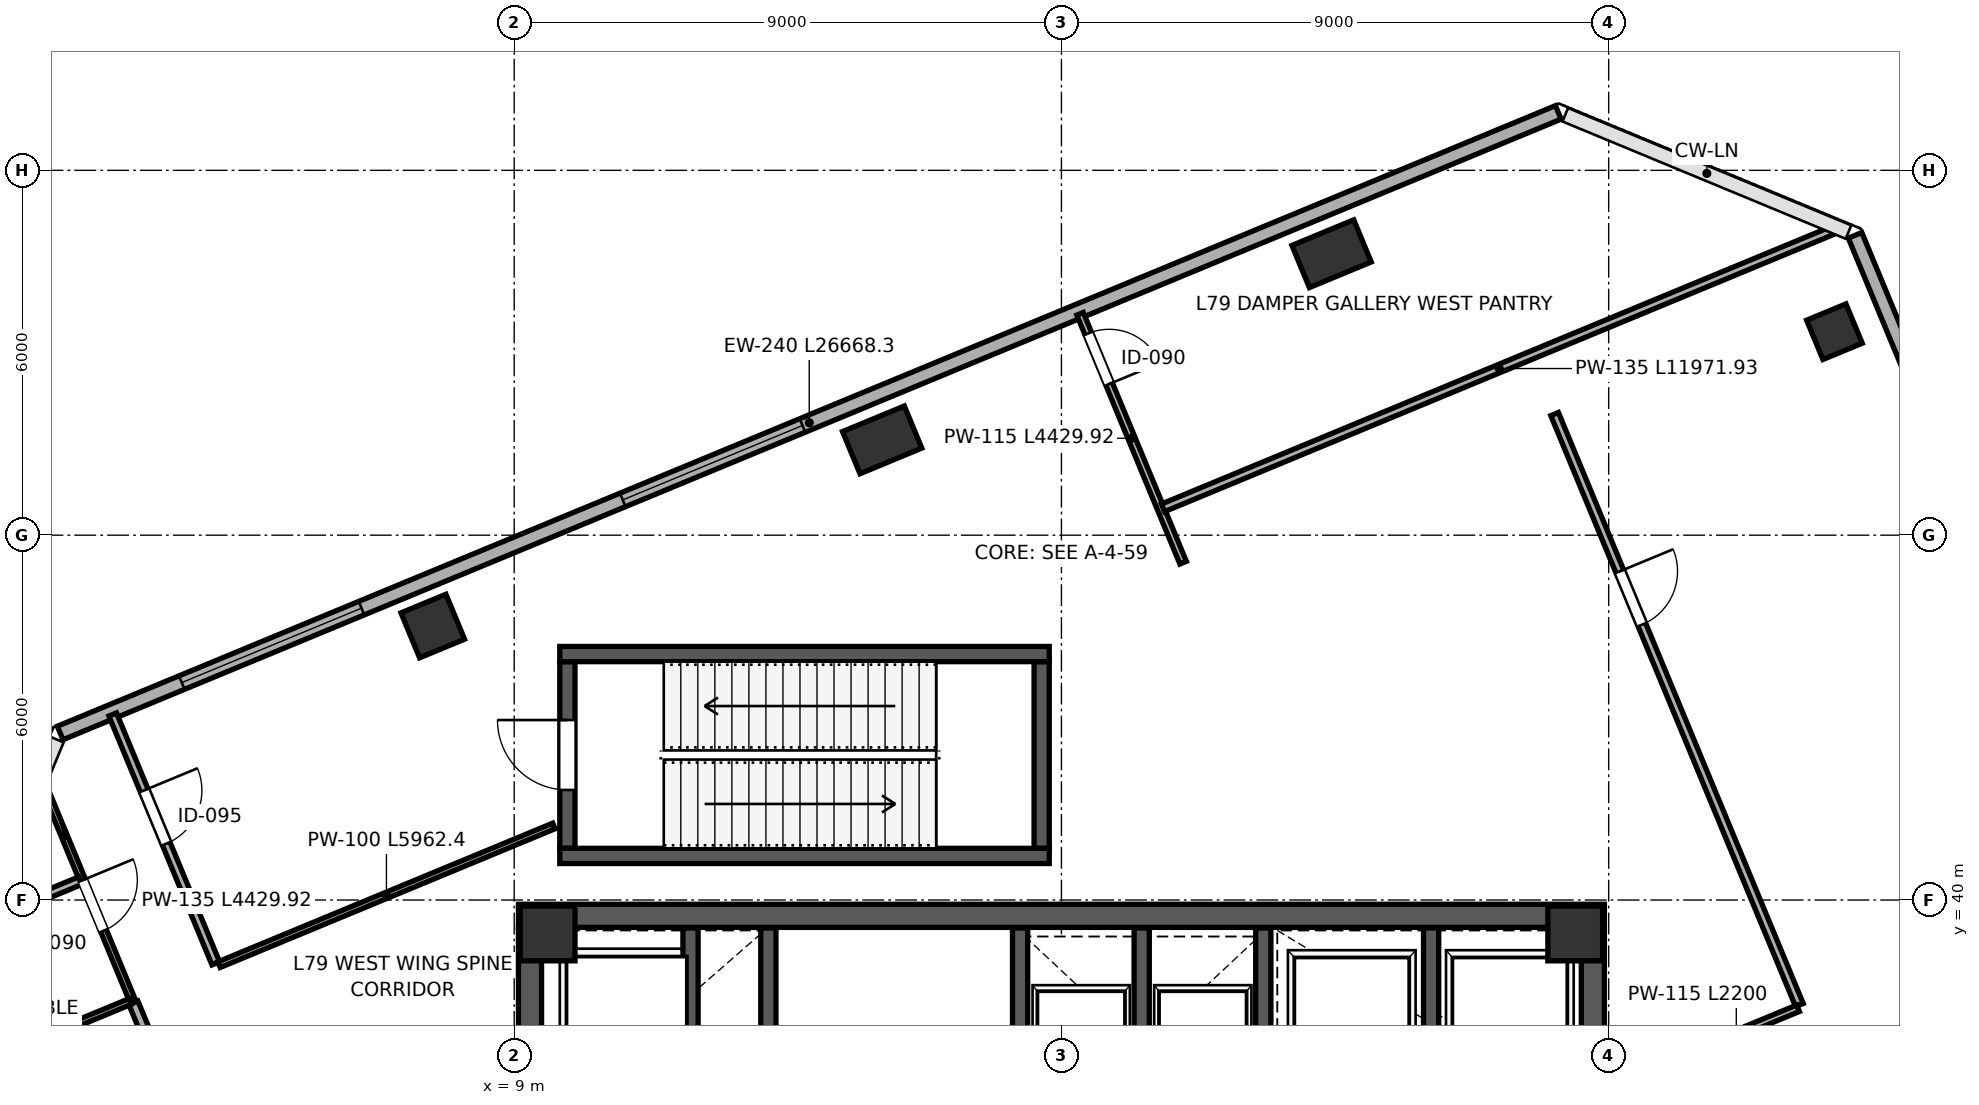
"""IFC4 building model, lengths in metres.
Left out: names, types, materials, properties, quantities, classifications, styles, units other than length and angle.
Written with IfcOpenShell. Run it as: python <this file> out.ifc"""

import sys

from ifc_helpers import new_model, si_unit, direction, frame, frame_2d, origin, origin_2d, place, context, subcontext, project, spatial, rectangle, extrude, source, transform, mapped, element, fill, save


model = new_model("IFC4")
c1 = context("Model", 3, precision=1e-05, world=origin(), true_north=direction((0.0, 1.0)))
c2 = subcontext(c1, "Body", "Model", "MODEL_VIEW")
j1 = project(units=[si_unit("LENGTHUNIT", "METRE"), si_unit("PLANEANGLEUNIT", "RADIAN")], contexts=[c1])
p1 = place(None, origin())
s1 = spatial("IfcSite", under=j1, at=p1, CompositionType="ELEMENT")
p2 = place(p1, origin())
s2 = spatial("IfcBuilding", under=s1, at=p2, CompositionType="ELEMENT")
p3 = place(p2, frame((0.0, 0.0, 349.2)))
s3 = spatial("IfcBuildingStorey", under=s2, at=p3, CompositionType="ELEMENT", Elevation=349.2)
m1 = source(origin(), c2, "Body", "SweptSolid", [
    extrude(rectangle(XDim=0.9, YDim=0.9, at=origin_2d()), origin(), (0.0, 0.0, 1.0), 5.999),
])
for number, where, z_axis, x_axis in (
    (1, (9.55, 39.45, 0.001), (0.0, 0.0, 1.0), (1.0, 0.0, 0.0)),
    (2, (26.45, 39.45, 0.001), (0.0, 0.0, 1.0), (1.0, 0.0, 0.0)),
):
    element("IfcColumn", number, at=place(p3, frame(where, z_axis=z_axis, x_axis=x_axis)), inside=s3, PredefinedType="COLUMN", context=c2, shape_type="MappedRepresentation", body=[
        mapped(m1, transform((0.0, 0.0, 0.0), scale=1.0)),
    ])
m2 = source(origin(), c2, "Body", "SweptSolid", [
    extrude(rectangle(XDim=0.7, YDim=0.7, at=origin_2d()), origin(), (0.0, 0.0, 1.0), 5.999),
])
p4 = place(p3, frame((30.713, 49.346, 0.001), z_axis=(0.0, 0.0, 1.0), x_axis=(-0.382683432365, 0.923879532511, 0.0)))
e3 = element("IfcColumn", 3, at=p4, inside=s3, PredefinedType="COLUMN", context=c2, shape_type="MappedRepresentation", body=[
    mapped(m2, transform((0.0, 0.0, 0.0), scale=1.0)),
])
m3 = source(origin(), c2, "Body", "SweptSolid", [
    extrude(rectangle(XDim=0.8, YDim=0.8, at=origin_2d()), origin(), (0.0, 0.0, 1.0), 5.999),
])
p5 = place(p3, frame((7.661, 44.506, 0.001), z_axis=(0.0, 0.0, 1.0), x_axis=(-0.382683432365, 0.923879532511, 0.0)))
e4 = element("IfcColumn", 4, at=p5, inside=s3, PredefinedType="COLUMN", context=c2, shape_type="MappedRepresentation", body=[
    mapped(m3, transform((0.0, 0.0, 0.0), scale=1.0)),
])
m4 = source(origin(), c2, "Body", "SweptSolid", [
    extrude(rectangle(XDim=0.75, YDim=1.1, at=origin_2d()), origin(), (0.0, 0.0, 1.0), 5.999),
])
for number, where, z_axis, x_axis in (
    (5, (15.052, 47.567, 0.001), (0.0, 0.0, 1.0), (-0.383, 0.924, 0.0)),
    (6, (22.443, 50.629, 0.001), (0.0, 0.0, 1.0), (-0.383, 0.924, 0.0)),
):
    element("IfcColumn", number, at=place(p3, frame(where, z_axis=z_axis, x_axis=x_axis)), inside=s3, PredefinedType="PILASTER", context=c2, shape_type="MappedRepresentation", body=[
        mapped(m4, transform((0.0, 0.0, 0.0), scale=1.0)),
    ])
p6 = place(p3, frame((40.761, 27.494, 0.0), z_axis=(0.0, 0.0, 1.0), x_axis=(-0.382690925775, 0.923876428604, 0.0)))
e7 = element("IfcWall", 7, at=p6, inside=s3, PredefinedType="SOLIDWALL", context=c2, shape_type="SweptSolid", body=[
    extrude(rectangle(XDim=25.368, YDim=0.24, at=frame_2d((12.684, 0.0))), origin(), (0.0, 0.0, 1.0), 5.76),
])
p7 = place(p6, frame((1.594, 0.0, 0.45)))
e8 = element("IfcOpeningElement", 8, at=p7, cuts=e7, PredefinedType="OPENING", context=c2, shape_type="SweptSolid", body=[
    extrude(rectangle(XDim=3.2, YDim=2.5, at=frame_2d((1.6, 1.25))), frame((0.0, 0.13, 0.0), z_axis=(0.0, -1.0, 0.0), x_axis=(1.0, 0.0, 0.0)), (0.0, 0.0, 1.0), 0.26),
])
p8 = place(p6, frame((5.144, 0.0, 0.45)))
e9 = element("IfcOpeningElement", 9, at=p8, cuts=e7, PredefinedType="OPENING", context=c2, shape_type="SweptSolid", body=[
    extrude(rectangle(XDim=3.2, YDim=2.5, at=frame_2d((1.6, 1.25))), frame((0.0, 0.13, 0.0), z_axis=(0.0, -1.0, 0.0), x_axis=(1.0, 0.0, 0.0)), (0.0, 0.0, 1.0), 0.26),
])
p9 = place(p6, frame((8.694, 0.0, 0.45)))
e10 = element("IfcOpeningElement", 10, at=p9, cuts=e7, PredefinedType="OPENING", context=c2, shape_type="SweptSolid", body=[
    extrude(rectangle(XDim=3.2, YDim=2.5, at=frame_2d((1.6, 1.25))), frame((0.0, 0.13, 0.0), z_axis=(0.0, -1.0, 0.0), x_axis=(1.0, 0.0, 0.0)), (0.0, 0.0, 1.0), 0.26),
])
p10 = place(p6, frame((12.244, 0.0, 0.45)))
e11 = element("IfcOpeningElement", 11, at=p10, cuts=e7, PredefinedType="OPENING", context=c2, shape_type="SweptSolid", body=[
    extrude(rectangle(XDim=3.2, YDim=2.5, at=frame_2d((1.6, 1.25))), frame((0.0, 0.13, 0.0), z_axis=(0.0, -1.0, 0.0), x_axis=(1.0, 0.0, 0.0)), (0.0, 0.0, 1.0), 0.26),
])
p11 = place(p6, frame((15.794, 0.0, 0.45)))
e12 = element("IfcOpeningElement", 12, at=p11, cuts=e7, PredefinedType="OPENING", context=c2, shape_type="SweptSolid", body=[
    extrude(rectangle(XDim=3.2, YDim=2.5, at=frame_2d((1.6, 1.25))), frame((0.0, 0.13, 0.0), z_axis=(0.0, -1.0, 0.0), x_axis=(1.0, 0.0, 0.0)), (0.0, 0.0, 1.0), 0.26),
])
p12 = place(p6, frame((19.344, 0.0, 0.45)))
e13 = element("IfcOpeningElement", 13, at=p12, cuts=e7, PredefinedType="OPENING", context=c2, shape_type="SweptSolid", body=[
    extrude(rectangle(XDim=3.2, YDim=2.5, at=frame_2d((1.6, 1.25))), frame((0.0, 0.13, 0.0), z_axis=(0.0, -1.0, 0.0), x_axis=(1.0, 0.0, 0.0)), (0.0, 0.0, 1.0), 0.26),
])
p13 = place(p3, frame((26.171, 52.953, 0.0), z_axis=(0.0, 0.0, 1.0), x_axis=(-0.923878251708, -0.382686524484, 0.0)))
e14 = element("IfcWall", 14, at=p13, inside=s3, PredefinedType="SOLIDWALL", context=c2, shape_type="SweptSolid", body=[
    extrude(rectangle(XDim=26.668, YDim=0.24, at=frame_2d((13.334, 0.0))), origin(), (0.0, 0.0, 1.0), 5.76),
])
p14 = place(p13, frame((13.454, 0.0, 0.45)))
e15 = element("IfcOpeningElement", 15, at=p14, cuts=e14, PredefinedType="OPENING", context=c2, shape_type="SweptSolid", body=[
    extrude(rectangle(XDim=3.2, YDim=2.5, at=frame_2d((1.6, 1.25))), frame((0.0, 0.13, 0.0), z_axis=(0.0, -1.0, 0.0), x_axis=(1.0, 0.0, 0.0)), (0.0, 0.0, 1.0), 0.26),
])
p15 = place(p13, frame((21.304, 0.0, 0.45)))
e16 = element("IfcOpeningElement", 16, at=p15, cuts=e14, PredefinedType="OPENING", context=c2, shape_type="SweptSolid", body=[
    extrude(rectangle(XDim=3.2, YDim=2.5, at=frame_2d((1.6, 1.25))), frame((0.0, 0.13, 0.0), z_axis=(0.0, -1.0, 0.0), x_axis=(1.0, 0.0, 0.0)), (0.0, 0.0, 1.0), 0.26),
])
p16 = place(p3, frame((9.26, 24.45, 0.0), z_axis=(0.0, 0.0, 1.0), x_axis=(0.0, 1.0, 0.0)))
e17 = element("IfcWall", 17, at=p16, inside=s3, PredefinedType="SHEAR", context=c2, shape_type="SweptSolid", body=[
    extrude(rectangle(XDim=15.1, YDim=0.38, at=frame_2d((7.55, 0.0))), origin(), (0.0, 0.0, 1.0), 5.76),
])
p17 = place(p16, frame((8.7, 0.0, 0.0)))
e18 = element("IfcOpeningElement", 18, at=p17, cuts=e17, PredefinedType="OPENING", context=c2, shape_type="SweptSolid", body=[
    extrude(rectangle(XDim=1.15, YDim=2.2, at=frame_2d((0.575, 1.1))), frame((0.0, 0.2, 0.0), z_axis=(0.0, -1.0, 0.0), x_axis=(1.0, 0.0, 0.0)), (0.0, 0.0, 1.0), 0.4),
])
p18 = place(p3, frame((26.74, 24.45, 0.0), z_axis=(0.0, 0.0, 1.0), x_axis=(0.0, 1.0, 0.0)))
e19 = element("IfcWall", 19, at=p18, inside=s3, PredefinedType="SHEAR", context=c2, shape_type="SweptSolid", body=[
    extrude(rectangle(XDim=15.1, YDim=0.38, at=frame_2d((7.55, 0.0))), origin(), (0.0, 0.0, 1.0), 5.76),
])
p19 = place(p18, frame((8.6, 0.0, 0.0)))
e20 = element("IfcOpeningElement", 20, at=p19, cuts=e19, PredefinedType="OPENING", context=c2, shape_type="SweptSolid", body=[
    extrude(rectangle(XDim=1.15, YDim=2.2, at=frame_2d((0.575, 1.1))), frame((0.0, 0.2, 0.0), z_axis=(0.0, -1.0, 0.0), x_axis=(1.0, 0.0, 0.0)), (0.0, 0.0, 1.0), 0.4),
])
p20 = place(p3, frame((9.07, 39.74, 0.0), z_axis=(0.0, 0.0, 1.0), x_axis=(1.0, 0.0, 0.0)))
e21 = element("IfcWall", 21, at=p20, inside=s3, PredefinedType="SHEAR", context=c2, shape_type="SweptSolid", body=[
    extrude(rectangle(XDim=17.86, YDim=0.38, at=frame_2d((8.93, 0.0))), origin(), (0.0, 0.0, 1.0), 5.76),
])
p21 = place(p3, frame((21.32, 32.12, 0.0), z_axis=(0.0, 0.0, 1.0), x_axis=(0.0, 1.0, 0.0)))
e22 = element("IfcWall", 22, at=p21, inside=s3, PredefinedType="SHEAR", context=c2, shape_type="SweptSolid", body=[
    extrude(rectangle(XDim=7.42, YDim=0.25, at=frame_2d((3.71, 0.0))), origin(), (0.0, 0.0, 1.0), 5.76),
])
p22 = place(p21, frame((1.4, 0.0, 0.0)))
e23 = element("IfcOpeningElement", 23, at=p22, cuts=e22, PredefinedType="OPENING", context=c2, shape_type="SweptSolid", body=[
    extrude(rectangle(XDim=1.15, YDim=2.2, at=frame_2d((0.575, 1.1))), frame((0.0, 0.135, 0.0), z_axis=(0.0, -1.0, 0.0), x_axis=(1.0, 0.0, 0.0)), (0.0, 0.0, 1.0), 0.27),
])
p23 = place(p3, frame((11.9, 36.31, 0.0), z_axis=(0.0, 0.0, 1.0), x_axis=(0.0, 1.0, 0.0)))
e24 = element("IfcWall", 24, at=p23, inside=s3, PredefinedType="SHEAR", context=c2, shape_type="SweptSolid", body=[
    extrude(rectangle(XDim=3.23, YDim=0.25, at=frame_2d((1.615, 0.0))), origin(), (0.0, 0.0, 1.0), 5.76),
])
p24 = place(p3, frame((24.08, 36.48, 0.0), z_axis=(0.0, 0.0, 1.0), x_axis=(0.0, 1.0, 0.0)))
e25 = element("IfcWall", 25, at=p24, inside=s3, PredefinedType="SHEAR", context=c2, shape_type="SweptSolid", body=[
    extrude(rectangle(XDim=3.06, YDim=0.25, at=frame_2d((1.53, 0.0))), origin(), (0.0, 0.0, 1.0), 5.76),
])
p25 = place(p3, frame((13.18, 36.2, 0.0), z_axis=(0.0, 0.0, 1.0), x_axis=(0.0, 1.0, 0.0)))
e26 = element("IfcWall", 26, at=p25, inside=s3, PredefinedType="SHEAR", context=c2, shape_type="SweptSolid", body=[
    extrude(rectangle(XDim=3.34, YDim=0.25, at=frame_2d((1.67, 0.0))), origin(), (0.0, 0.0, 1.0), 5.76),
])
for number, where, z_axis, x_axis in (
    (27, (17.32, 35.81, 0.0), (0.0, 0.0, 1.0), (0.0, 1.0, 0.0)),
    (28, (19.32, 35.81, 0.0), (0.0, 0.0, 1.0), (0.0, 1.0, 0.0)),
):
    element("IfcWall", number, at=place(p3, frame(where, z_axis=z_axis, x_axis=x_axis)), inside=s3, PredefinedType="SHEAR", context=c2, shape_type="SweptSolid", body=[
        extrude(rectangle(XDim=3.73, YDim=0.25, at=frame_2d((1.865, 0.0))), origin(), (0.0, 0.0, 1.0), 5.76),
    ])
p26 = place(p3, frame((9.875, 40.85, 0.0), z_axis=(0.0, 0.0, 1.0), x_axis=(0.0, 1.0, 0.0)))
e29 = element("IfcWall", 29, at=p26, inside=s3, PredefinedType="SHEAR", context=c2, shape_type="SweptSolid", body=[
    extrude(rectangle(XDim=3.07, YDim=0.25, at=frame_2d((1.535, 0.0))), origin(), (0.0, 0.0, 1.0), 5.76),
])
p27 = place(p26, frame((0.96, 0.0, 0.0)))
e30 = element("IfcOpeningElement", 30, at=p27, cuts=e29, PredefinedType="OPENING", context=c2, shape_type="SweptSolid", body=[
    extrude(rectangle(XDim=1.15, YDim=2.2, at=frame_2d((0.575, 1.1))), frame((0.0, 0.135, 0.0), z_axis=(0.0, -1.0, 0.0), x_axis=(1.0, 0.0, 0.0)), (0.0, 0.0, 1.0), 0.27),
])
p28 = place(p3, frame((17.675, 40.85, 0.0), z_axis=(0.0, 0.0, 1.0), x_axis=(0.0, 1.0, 0.0)))
e31 = element("IfcWall", 31, at=p28, inside=s3, PredefinedType="SHEAR", context=c2, shape_type="SweptSolid", body=[
    extrude(rectangle(XDim=3.07, YDim=0.25, at=frame_2d((1.535, 0.0))), origin(), (0.0, 0.0, 1.0), 5.76),
])
for number, where, z_axis, x_axis in (
    (32, (9.75, 40.725, 0.0), (0.0, 0.0, 1.0), (1.0, 0.0, 0.0)),
    (33, (9.75, 44.045, 0.0), (0.0, 0.0, 1.0), (1.0, 0.0, 0.0)),
):
    element("IfcWall", number, at=place(p3, frame(where, z_axis=z_axis, x_axis=x_axis)), inside=s3, PredefinedType="SHEAR", context=c2, shape_type="SweptSolid", body=[
        extrude(rectangle(XDim=8.05, YDim=0.25, at=frame_2d((4.025, 0.0))), origin(), (0.0, 0.0, 1.0), 5.76),
    ])
p29 = place(p3, frame((1.232, 41.943, 0.0), z_axis=(0.0, 0.0, 1.0), x_axis=(0.382652221475, -0.923892459868, 0.0)))
e34 = element("IfcWall", 34, at=p29, inside=s3, PredefinedType="PARTITIONING", context=c2, shape_type="SweptSolid", body=[
    extrude(rectangle(XDim=3.852, YDim=0.1, at=frame_2d((1.926, 0.0))), origin(), (0.0, 0.0, 1.0), 5.76),
])
p30 = place(p29, frame((1.75, 0.0, 0.0)))
e35 = element("IfcOpeningElement", 35, at=p30, cuts=e34, PredefinedType="OPENING", context=c2, shape_type="SweptSolid", body=[
    extrude(rectangle(XDim=0.9, YDim=2.15, at=frame_2d((0.45, 1.075))), frame((0.0, 0.06, 0.0), z_axis=(0.0, -1.0, 0.0), x_axis=(1.0, 0.0, 0.0)), (0.0, 0.0, 1.0), 0.12),
])
p31 = place(p3, frame((0.29, 39.667, 0.0), z_axis=(0.0, 0.0, 1.0), x_axis=(0.923855963606, 0.38274032778, 0.0)))
e36 = element("IfcWall", 36, at=p31, inside=s3, PredefinedType="PARTITIONING", context=c2, shape_type="SweptSolid", body=[
    extrude(rectangle(XDim=1.702, YDim=0.135, at=frame_2d((0.851, 0.0))), origin(), (0.0, 0.0, 1.0), 5.76),
])
p32 = place(p3, frame((2.737, 38.31, 0.0), z_axis=(0.0, 0.0, 1.0), x_axis=(0.382706260748, -0.923870076355, 0.0)))
e37 = element("IfcWall", 37, at=p32, inside=s3, PredefinedType="PARTITIONING", context=c2, shape_type="SweptSolid", body=[
    extrude(rectangle(XDim=3.67, YDim=0.16, at=frame_2d((1.835, 0.0))), origin(), (0.0, 0.0, 1.0), 5.76),
])
p33 = place(p32, frame((0.85, 0.0, 0.0)))
e38 = element("IfcOpeningElement", 38, at=p33, cuts=e37, PredefinedType="OPENING", context=c2, shape_type="SweptSolid", body=[
    extrude(rectangle(XDim=0.95, YDim=2.15, at=frame_2d((0.475, 1.075))), frame((0.0, 0.09, 0.0), z_axis=(0.0, -1.0, 0.0), x_axis=(1.0, 0.0, 0.0)), (0.0, 0.0, 1.0), 0.18),
])
p34 = place(p3, frame((-0.142, 37.161, 0.0), z_axis=(0.0, 0.0, 1.0), x_axis=(0.923868053335, 0.382711144374, 0.0)))
e39 = element("IfcWall", 39, at=p34, inside=s3, PredefinedType="PARTITIONING", context=c2, shape_type="SweptSolid", body=[
    extrude(rectangle(XDim=3.06, YDim=0.1, at=frame_2d((1.53, 0.0))), origin(), (0.0, 0.0, 1.0), 5.76),
])
p35 = place(p3, frame((26.111, 47.992, 0.0), z_axis=(0.0, 0.0, 1.0), x_axis=(0.382686563741, -0.923878235447, 0.0)))
e40 = element("IfcWall", 40, at=p35, inside=s3, PredefinedType="PARTITIONING", context=c2, shape_type="SweptSolid", body=[
    extrude(rectangle(XDim=10.52, YDim=0.135, at=frame_2d((5.26, 0.0))), origin(), (0.0, 0.0, 1.0), 5.76),
])
p36 = place(p35, frame((2.8, 0.0, 0.0)))
e41 = element("IfcOpeningElement", 41, at=p36, cuts=e40, PredefinedType="OPENING", context=c2, shape_type="SweptSolid", body=[
    extrude(rectangle(XDim=0.95, YDim=2.15, at=frame_2d((0.475, 1.075))), frame((0.0, 0.078, 0.0), z_axis=(0.0, -1.0, 0.0), x_axis=(1.0, 0.0, 0.0)), (0.0, 0.0, 1.0), 0.155),
])
p37 = place(p3, frame((28.083, 37.378, 0.0), z_axis=(0.0, 0.0, 1.0), x_axis=(0.923853160736, 0.382747093259, 0.0)))
e42 = element("IfcWall", 42, at=p37, inside=s3, PredefinedType="PARTITIONING", context=c2, shape_type="SweptSolid", body=[
    extrude(rectangle(XDim=2.2, YDim=0.115, at=frame_2d((1.1, 0.0))), origin(), (0.0, 0.0, 1.0), 5.76),
])
p38 = place(p3, frame((2.397, 43.051, 0.0), z_axis=(0.0, 0.0, 1.0), x_axis=(0.382689257808, -0.923877119512, 0.0)))
e43 = element("IfcWall", 43, at=p38, inside=s3, PredefinedType="PARTITIONING", context=c2, shape_type="SweptSolid", body=[
    extrude(rectangle(XDim=4.43, YDim=0.135, at=frame_2d((2.215, 0.0))), origin(), (0.0, 0.0, 1.0), 5.76),
])
p39 = place(p38, frame((1.35, 0.0, 0.0)))
e44 = element("IfcOpeningElement", 44, at=p39, cuts=e43, PredefinedType="OPENING", context=c2, shape_type="SweptSolid", body=[
    extrude(rectangle(XDim=0.95, YDim=2.15, at=frame_2d((0.475, 1.075))), frame((0.0, 0.078, 0.0), z_axis=(0.0, -1.0, 0.0), x_axis=(1.0, 0.0, 0.0)), (0.0, 0.0, 1.0), 0.155),
])
p40 = place(p3, frame((18.306, 49.64, 0.0), z_axis=(0.0, 0.0, 1.0), x_axis=(0.382708743564, -0.923869047863, 0.0)))
e45 = element("IfcWall", 45, at=p40, inside=s3, PredefinedType="PARTITIONING", context=c2, shape_type="SweptSolid", body=[
    extrude(rectangle(XDim=4.43, YDim=0.115, at=frame_2d((2.215, 0.0))), origin(), (0.0, 0.0, 1.0), 5.095),
])
p41 = place(p40, frame((0.35, 0.0, 0.0)))
e46 = element("IfcOpeningElement", 46, at=p41, cuts=e45, PredefinedType="OPENING", context=c2, shape_type="SweptSolid", body=[
    extrude(rectangle(XDim=0.9, YDim=2.15, at=frame_2d((0.45, 1.075))), frame((0.0, 0.067, 0.0), z_axis=(0.0, -1.0, 0.0), x_axis=(1.0, 0.0, 0.0)), (0.0, 0.0, 1.0), 0.135),
])
p42 = place(p3, frame((4.145, 38.936, 0.0), z_axis=(0.0, 0.0, 1.0), x_axis=(0.923878093623, 0.38268690613, 0.0)))
e47 = element("IfcWall", 47, at=p42, inside=s3, PredefinedType="PARTITIONING", context=c2, shape_type="SweptSolid", body=[
    extrude(rectangle(XDim=5.962, YDim=0.1, at=frame_2d((2.981, 0.0))), origin(), (0.0, 0.0, 1.0), 5.76),
])
p43 = place(p3, frame((19.671, 46.45, 0.0), z_axis=(0.0, 0.0, 1.0), x_axis=(0.923879139167, 0.38268438198, 0.0)))
e48 = element("IfcWall", 48, at=p43, inside=s3, PredefinedType="PARTITIONING", context=c2, shape_type="SweptSolid", body=[
    extrude(rectangle(XDim=11.972, YDim=0.135, at=frame_2d((5.986, 0.0))), origin(), (0.0, 0.0, 1.0), 5.76),
])
m5 = source(origin(), c2, "Body", "SweptSolid", [
    extrude(rectangle(XDim=3.2, YDim=2.5, at=frame_2d((1.6, 1.25))), frame((0.0, 0.03, 0.0), z_axis=(0.0, -1.0, 0.0), x_axis=(1.0, 0.0, 0.0)), (0.0, 0.0, 1.0), 0.06),
])
p44 = place(p14, origin())
e49 = element("IfcWindow", 49, at=p44, inside=s3, PartitioningType="TRIPLE_PANEL_VERTICAL", PredefinedType="WINDOW", context=c2, shape_type="MappedRepresentation", body=[
    mapped(m5, transform((0.0, 0.0, 0.0), scale=1.0)),
])
fill(e15, e49)
p45 = place(p15, origin())
e50 = element("IfcWindow", 50, at=p45, inside=s3, PartitioningType="TRIPLE_PANEL_VERTICAL", PredefinedType="WINDOW", context=c2, shape_type="MappedRepresentation", body=[
    mapped(m5, transform((0.0, 0.0, 0.0), scale=1.0)),
])
fill(e16, e50)
m6 = source(origin(), c2, "Body", "SweptSolid", [
    extrude(rectangle(XDim=1.15, YDim=2.2, at=frame_2d((0.575, 1.1))), frame((0.0, 0.025, 0.0), z_axis=(0.0, -1.0, 0.0), x_axis=(1.0, 0.0, 0.0)), (0.0, 0.0, 1.0), 0.05),
])
p46 = place(p27, origin())
e51 = element("IfcDoor", 51, at=p46, inside=s3, OperationType="SINGLE_SWING_RIGHT", PredefinedType="DOOR", context=c2, shape_type="MappedRepresentation", body=[
    mapped(m6, transform((0.0, 0.0, 0.0), scale=1.0)),
])
fill(e30, e51)
m7 = source(origin(), c2, "Body", "SweptSolid", [
    extrude(rectangle(XDim=0.9, YDim=2.15, at=frame_2d((0.45, 1.075))), frame((0.0, 0.025, 0.0), z_axis=(0.0, -1.0, 0.0), x_axis=(1.0, 0.0, 0.0)), (0.0, 0.0, 1.0), 0.05),
])
p47 = place(p30, origin())
e52 = element("IfcDoor", 52, at=p47, inside=s3, OperationType="SINGLE_SWING_LEFT", PredefinedType="DOOR", context=c2, shape_type="MappedRepresentation", body=[
    mapped(m7, transform((0.0, 0.0, 0.0), scale=1.0)),
])
fill(e35, e52)
m8 = source(origin(), c2, "Body", "SweptSolid", [
    extrude(rectangle(XDim=0.95, YDim=2.15, at=frame_2d((0.475, 1.075))), frame((0.0, 0.025, 0.0), z_axis=(0.0, -1.0, 0.0), x_axis=(1.0, 0.0, 0.0)), (0.0, 0.0, 1.0), 0.05),
])
p48 = place(p36, origin())
e53 = element("IfcDoor", 53, at=p48, inside=s3, OperationType="SINGLE_SWING_LEFT", PredefinedType="DOOR", context=c2, shape_type="MappedRepresentation", body=[
    mapped(m8, transform((0.0, 0.0, 0.0), scale=1.0)),
])
fill(e41, e53)
p49 = place(p39, origin())
e54 = element("IfcDoor", 54, at=p49, inside=s3, OperationType="SINGLE_SWING_LEFT", PredefinedType="DOOR", context=c2, shape_type="MappedRepresentation", body=[
    mapped(m8, transform((0.0, 0.0, 0.0), scale=1.0)),
])
fill(e44, e54)
p50 = place(p41, origin())
e55 = element("IfcDoor", 55, at=p50, inside=s3, OperationType="SINGLE_SWING_RIGHT", PredefinedType="DOOR", context=c2, shape_type="MappedRepresentation", body=[
    mapped(m7, transform((0.0, 0.0, 0.0), scale=1.0)),
])
fill(e46, e55)
save(model, sys.argv[1])
